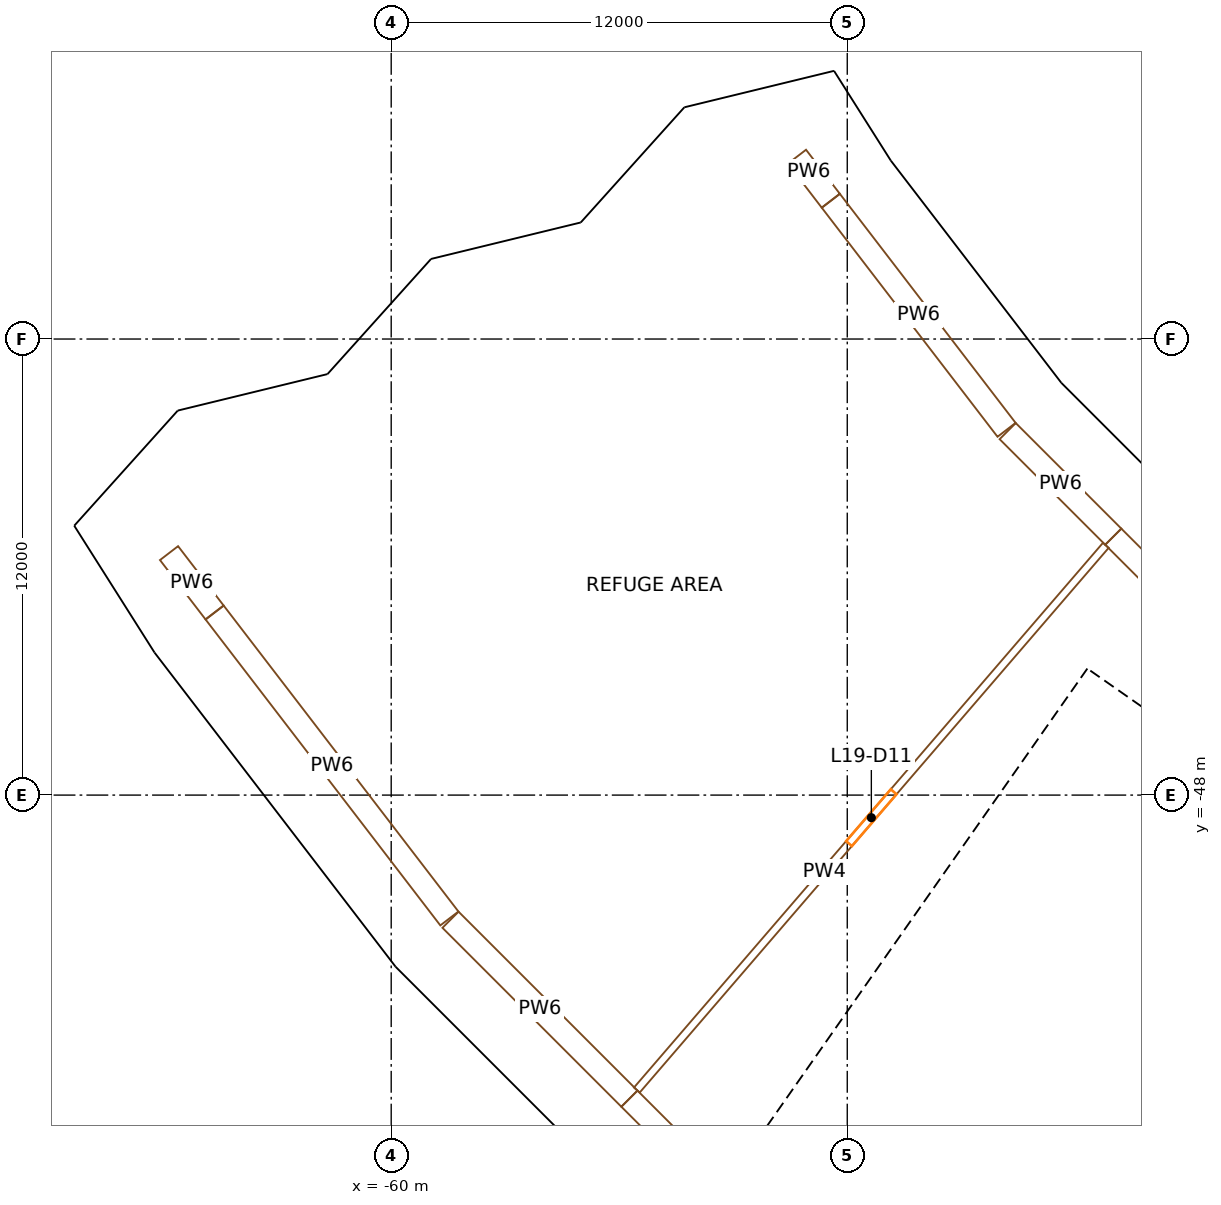
"""IFC4 building model, lengths in metres.
Left out: names, types, materials, properties, quantities, classifications, styles, units other than length and angle.
Written with IfcOpenShell. Run it as: python <this file> out.ifc"""

import sys

from ifc_helpers import new_model, si_unit, direction, frame, frame_2d, origin, origin_2d, place, context, subcontext, project, spatial, rectangle, extrude, element, fill, save


model = new_model("IFC4")
c1 = context("Model", 3, precision=1e-05, world=origin(), true_north=direction((0.0, 1.0)))
c2 = subcontext(c1, "Body", "Model", "MODEL_VIEW")
j1 = project(units=[si_unit("LENGTHUNIT", "METRE"), si_unit("PLANEANGLEUNIT", "RADIAN")], contexts=[c1])
p1 = place(None, origin())
s1 = spatial("IfcSite", under=j1, at=p1, CompositionType="ELEMENT")
p2 = place(p1, origin())
s2 = spatial("IfcBuilding", under=s1, at=p2, CompositionType="ELEMENT")
p3 = place(p2, frame((0.0, 0.0, 89.9)))
s3 = spatial("IfcBuildingStorey", under=s2, at=p3, CompositionType="ELEMENT", Elevation=89.9)
for number, where, z_axis, x_axis in (
    (1, (-48.433, -32.362, 0.0), (0.0, 0.0, 1.0), (0.556, -0.831, 0.0)),
    (2, (-64.647, -43.196, 0.0), (0.0, 0.0, 1.0), (0.556, -0.831, 0.0)),
    (3, (-43.795, -38.407, 0.0), (0.0, 0.0, 1.0), (0.659, -0.752, 0.0)),
    (4, (-58.456, -51.264, 0.0), (0.0, 0.0, 1.0), (0.659, -0.752, 0.0)),
):
    element("IfcColumn", number, at=place(p3, frame(where, z_axis=z_axis, x_axis=x_axis)), inside=s3, PredefinedType="COLUMN", context=c2, shape_type="SweptSolid", body=[
        extrude(rectangle(XDim=1.3, YDim=1.7, at=origin_2d()), origin(), (0.0, 0.0, 1.0), 5.0),
    ])
p4 = place(p3, frame((-69.732, -34.388, 0.0), z_axis=(0.0, 0.0, 1.0), x_axis=(0.442288690219, -0.896872741533, 0.0)))
e5 = element("IfcColumn", 5, at=p4, inside=s3, PredefinedType="COLUMN", context=c2, shape_type="SweptSolid", body=[
    extrude(rectangle(XDim=1.3, YDim=1.7, at=origin_2d()), origin(), (0.0, 0.0, 1.0), 4.7),
])
p5 = place(p3, frame((-49.779, -57.191, 0.0), z_axis=(0.0, 0.0, 1.0), x_axis=(0.573577477574, 0.819151315216, 0.0)))
e6 = element("IfcWall", 6, at=p5, inside=s3, PredefinedType="SHEAR", context=c2, shape_type="SweptSolid", body=[
    extrude(rectangle(XDim=14.8, YDim=0.9, at=frame_2d((7.4, 0.0))), origin(), (0.0, 0.0, 1.0), 4.7),
])
p6 = place(p5, frame((6.7, 0.0, 0.0)))
e7 = element("IfcOpeningElement", 7, at=p6, cuts=e6, PredefinedType="OPENING", context=c2, shape_type="SweptSolid", body=[
    extrude(rectangle(XDim=1.4, YDim=2.1, at=frame_2d((0.7, 1.05))), frame((0.0, 0.46, 0.0), z_axis=(0.0, -1.0, 0.0), x_axis=(1.0, 0.0, 0.0)), (0.0, 0.0, 1.0), 0.92),
])
p7 = place(p3, frame((-28.854, -54.324, 0.0), z_axis=(0.0, 0.0, 1.0), x_axis=(-0.819145767589, 0.573585400304, 0.0)))
e8 = element("IfcWall", 8, at=p7, inside=s3, PredefinedType="SHEAR", context=c2, shape_type="SweptSolid", body=[
    extrude(rectangle(XDim=15.045, YDim=0.9, at=frame_2d((7.523, 0.0))), origin(), (0.0, 0.0, 1.0), 4.7),
])
p8 = place(p7, frame((3.45, 0.0, 0.0)))
e9 = element("IfcOpeningElement", 9, at=p8, cuts=e8, PredefinedType="OPENING", context=c2, shape_type="SweptSolid", body=[
    extrude(rectangle(XDim=1.0, YDim=2.1, at=frame_2d((0.5, 1.05))), frame((0.0, 0.46, 0.0), z_axis=(0.0, -1.0, 0.0), x_axis=(1.0, 0.0, 0.0)), (0.0, 0.0, 1.0), 0.92),
])
p9 = place(p7, frame((13.495, 0.0, 0.0)))
e10 = element("IfcOpeningElement", 10, at=p9, cuts=e8, PredefinedType="OPENING", context=c2, shape_type="SweptSolid", body=[
    extrude(rectangle(XDim=1.1, YDim=2.1, at=frame_2d((0.55, 1.05))), frame((0.0, 0.46, 0.0), z_axis=(0.0, -1.0, 0.0), x_axis=(1.0, 0.0, 0.0)), (0.0, 0.0, 1.0), 0.92),
])
p10 = place(p3, frame((-43.204, -60.696, 0.0), z_axis=(0.0, 0.0, 1.0), x_axis=(0.573571992966, 0.819155155563, 0.0)))
e11 = element("IfcWall", 11, at=p10, inside=s3, PredefinedType="SOLIDWALL", context=c2, shape_type="SweptSolid", body=[
    extrude(rectangle(XDim=13.0, YDim=0.3, at=frame_2d((6.5, 0.0))), origin(), (0.0, 0.0, 1.0), 4.7),
])
p11 = place(p3, frame((-33.787, -61.369, 0.0), z_axis=(0.0, 0.0, 1.0), x_axis=(-0.819152564888, 0.573575692858, 0.0)))
e12 = element("IfcWall", 12, at=p11, inside=s3, PredefinedType="SOLIDWALL", context=c2, shape_type="SweptSolid", body=[
    extrude(rectangle(XDim=7.95, YDim=0.3, at=frame_2d((3.975, 0.0))), origin(), (0.0, 0.0, 1.0), 4.7),
])
p12 = place(p11, frame((3.475, 0.0, 0.0)))
e13 = element("IfcOpeningElement", 13, at=p12, cuts=e12, PredefinedType="OPENING", context=c2, shape_type="SweptSolid", body=[
    extrude(rectangle(XDim=1.0, YDim=2.1, at=frame_2d((0.5, 1.05))), frame((0.0, 0.16, 0.0), z_axis=(0.0, -1.0, 0.0), x_axis=(1.0, 0.0, 0.0)), (0.0, 0.0, 1.0), 0.32),
])
p13 = place(p3, frame((-37.936, -52.91, 0.0), z_axis=(0.0, 0.0, 1.0), x_axis=(-0.819147518138, 0.57358290031, 0.0)))
e14 = element("IfcWall", 14, at=p13, inside=s3, PredefinedType="SOLIDWALL", context=c2, shape_type="SweptSolid", body=[
    extrude(rectangle(XDim=6.795, YDim=0.3, at=frame_2d((3.398, 0.0))), origin(), (0.0, 0.0, 1.0), 4.7),
])
p14 = place(p13, frame((5.32, 0.0, 0.0)))
e15 = element("IfcOpeningElement", 15, at=p14, cuts=e14, PredefinedType="OPENING", context=c2, shape_type="SweptSolid", body=[
    extrude(rectangle(XDim=1.1, YDim=2.1, at=frame_2d((0.55, 1.05))), frame((0.0, 0.16, 0.0), z_axis=(0.0, -1.0, 0.0), x_axis=(1.0, 0.0, 0.0)), (0.0, 0.0, 1.0), 0.32),
])
p15 = place(p3, frame((-41.262, -57.661, 0.0), z_axis=(0.0, 0.0, 1.0), x_axis=(-0.819164398642, 0.573558792102, 0.0)))
e16 = element("IfcWall", 16, at=p15, inside=s3, PredefinedType="SOLIDWALL", context=c2, shape_type="SweptSolid", body=[
    extrude(rectangle(XDim=6.795, YDim=0.3, at=frame_2d((3.397, 0.0))), origin(), (0.0, 0.0, 1.0), 4.7),
])
p16 = place(p15, frame((5.32, 0.0, 0.0)))
e17 = element("IfcOpeningElement", 17, at=p16, cuts=e16, PredefinedType="OPENING", context=c2, shape_type="SweptSolid", body=[
    extrude(rectangle(XDim=1.1, YDim=2.1, at=frame_2d((0.55, 1.05))), frame((0.0, 0.16, 0.0), z_axis=(0.0, -1.0, 0.0), x_axis=(1.0, 0.0, 0.0)), (0.0, 0.0, 1.0), 0.32),
])
p17 = place(p3, frame((-39.599, -55.285, 0.0), z_axis=(0.0, 0.0, 1.0), x_axis=(-0.819136323161, 0.573598887793, 0.0)))
e18 = element("IfcWall", 18, at=p17, inside=s3, PredefinedType="SOLIDWALL", context=c2, shape_type="SweptSolid", body=[
    extrude(rectangle(XDim=3.0, YDim=0.5, at=frame_2d((1.5, 0.0))), origin(), (0.0, 0.0, 1.0), 4.7),
])
p18 = place(p3, frame((-43.757, -55.731, 0.0), z_axis=(0.0, 0.0, 1.0), x_axis=(0.573536818435, 0.819179783625, 0.0)))
e19 = element("IfcWall", 19, at=p18, inside=s3, PredefinedType="SOLIDWALL", context=c2, shape_type="SweptSolid", body=[
    extrude(rectangle(XDim=5.5, YDim=0.3, at=frame_2d((2.75, 0.0))), origin(), (0.0, 0.0, 1.0), 4.7),
])
p19 = place(p18, frame((0.7, 0.0, 0.0)))
e20 = element("IfcOpeningElement", 20, at=p19, cuts=e19, PredefinedType="OPENING", context=c2, shape_type="SweptSolid", body=[
    extrude(rectangle(XDim=1.1, YDim=2.1, at=frame_2d((0.55, 1.05))), frame((0.0, 0.16, 0.0), z_axis=(0.0, -1.0, 0.0), x_axis=(1.0, 0.0, 0.0)), (0.0, 0.0, 1.0), 0.32),
])
p20 = place(p18, frame((3.7, 0.0, 0.0)))
e21 = element("IfcOpeningElement", 21, at=p20, cuts=e19, PredefinedType="OPENING", context=c2, shape_type="SweptSolid", body=[
    extrude(rectangle(XDim=1.1, YDim=2.1, at=frame_2d((0.55, 1.05))), frame((0.0, 0.16, 0.0), z_axis=(0.0, -1.0, 0.0), x_axis=(1.0, 0.0, 0.0)), (0.0, 0.0, 1.0), 0.32),
])
p21 = place(p3, frame((-41.587, -48.369, 0.0), z_axis=(0.0, 0.0, 1.0), x_axis=(0.573495128918, 0.819208970354, 0.0)))
e22 = element("IfcWall", 22, at=p21, inside=s3, PredefinedType="SOLIDWALL", context=c2, shape_type="SweptSolid", body=[
    extrude(rectangle(XDim=0.5, YDim=0.3, at=frame_2d((0.25, 0.0))), origin(), (0.0, 0.0, 1.0), 2.3),
])
p22 = place(p3, frame((-47.065, -56.192, 0.0), z_axis=(0.0, 0.0, 1.0), x_axis=(0.573822822947, 0.818979467304, 0.0)))
e23 = element("IfcWall", 23, at=p22, inside=s3, PredefinedType="SOLIDWALL", context=c2, shape_type="SweptSolid", body=[
    extrude(rectangle(XDim=0.5, YDim=0.3, at=frame_2d((0.25, 0.0))), origin(), (0.0, 0.0, 1.0), 2.3),
])
p23 = place(p3, frame((-48.256, -29.127, 0.0), z_axis=(0.0, 0.0, 1.0), x_axis=(-0.971599606195, -0.236630947347, 0.0)))
e24 = element("IfcWall", 24, at=p23, inside=s3, PredefinedType="SOLIDWALL", context=c2, shape_type="SweptSolid", body=[
    extrude(rectangle(XDim=4.147, YDim=0.4, at=frame_2d((2.074, 0.0))), origin(), (0.0, 0.0, 1.0), 3.6),
])
p24 = place(p3, frame((-52.315, -30.234, 0.0), z_axis=(0.0, 0.0, 1.0), x_axis=(-0.668791930539, -0.743449630874, 0.0)))
e25 = element("IfcWall", 25, at=p24, inside=s3, PredefinedType="SOLIDWALL", context=c2, shape_type="SweptSolid", body=[
    extrude(rectangle(XDim=3.669, YDim=0.4, at=frame_2d((1.834, 0.0))), origin(), (0.0, 0.0, 1.0), 3.6),
])
p25 = place(p3, frame((-54.798, -33.087, 0.0), z_axis=(0.0, 0.0, 1.0), x_axis=(-0.97158316365, -0.236698449745, 0.0)))
e26 = element("IfcWall", 26, at=p25, inside=s3, PredefinedType="SOLIDWALL", context=c2, shape_type="SweptSolid", body=[
    extrude(rectangle(XDim=4.274, YDim=0.4, at=frame_2d((2.137, 0.0))), origin(), (0.0, 0.0, 1.0), 3.6),
])
p26 = place(p3, frame((-58.98, -34.224, 0.0), z_axis=(0.0, 0.0, 1.0), x_axis=(-0.66870725962, -0.74352579036, 0.0)))
e27 = element("IfcWall", 27, at=p26, inside=s3, PredefinedType="SOLIDWALL", context=c2, shape_type="SweptSolid", body=[
    extrude(rectangle(XDim=3.668, YDim=0.4, at=frame_2d((1.834, 0.0))), origin(), (0.0, 0.0, 1.0), 3.6),
])
p27 = place(p3, frame((-61.462, -37.076, 0.0), z_axis=(0.0, 0.0, 1.0), x_axis=(-0.971569694649, -0.236753729518, 0.0)))
e28 = element("IfcWall", 28, at=p27, inside=s3, PredefinedType="SOLIDWALL", context=c2, shape_type="SweptSolid", body=[
    extrude(rectangle(XDim=4.275, YDim=0.4, at=frame_2d((2.138, 0.0))), origin(), (0.0, 0.0, 1.0), 3.6),
])
p28 = place(p3, frame((-65.645, -38.214, 0.0), z_axis=(0.0, 0.0, 1.0), x_axis=(-0.668632717238, -0.743592825032, 0.0)))
e29 = element("IfcWall", 29, at=p28, inside=s3, PredefinedType="SOLIDWALL", context=c2, shape_type="SweptSolid", body=[
    extrude(rectangle(XDim=3.413, YDim=0.4, at=frame_2d((1.707, 0.0))), origin(), (0.0, 0.0, 1.0), 3.6),
])
p29 = place(p3, frame((-47.038, -31.389, 0.0), z_axis=(0.0, 0.0, 1.0), x_axis=(-0.534817117293, 0.844967840246, 0.0)))
e30 = element("IfcWall", 30, at=p29, inside=s3, PredefinedType="SOLIDWALL", context=c2, shape_type="SweptSolid", body=[
    extrude(rectangle(XDim=2.373, YDim=0.4, at=frame_2d((1.187, 0.0))), origin(), (0.0, 0.0, 1.0), 3.6),
])
p30 = place(p3, frame((-42.502, -37.306, 0.0), z_axis=(0.0, 0.0, 1.0), x_axis=(-0.60873951703, 0.793370153463, 0.0)))
e31 = element("IfcWall", 31, at=p30, inside=s3, PredefinedType="SOLIDWALL", context=c2, shape_type="SweptSolid", body=[
    extrude(rectangle(XDim=7.438, YDim=0.4, at=frame_2d((3.719, 0.0))), origin(), (0.0, 0.0, 1.0), 3.6),
])
p31 = place(p3, frame((-37.322, -42.481, 0.0), z_axis=(0.0, 0.0, 1.0), x_axis=(-0.707106781187, 0.707106781187, 0.0)))
e32 = element("IfcWall", 32, at=p31, inside=s3, PredefinedType="SOLIDWALL", context=c2, shape_type="SweptSolid", body=[
    extrude(rectangle(XDim=7.295, YDim=0.4, at=frame_2d((3.648, 0.0))), origin(), (0.0, 0.0, 1.0), 3.6),
])
p32 = place(p3, frame((-68.191, -40.772, 0.0), z_axis=(0.0, 0.0, 1.0), x_axis=(0.534740631213, -0.845016246785, 0.0)))
e33 = element("IfcWall", 33, at=p32, inside=s3, PredefinedType="SOLIDWALL", context=c2, shape_type="SweptSolid", body=[
    extrude(rectangle(XDim=2.014, YDim=0.4, at=frame_2d((1.007, 0.0))), origin(), (0.0, 0.0, 1.0), 3.6),
])
p33 = place(p3, frame((-67.114, -42.475, 0.0), z_axis=(0.0, 0.0, 1.0), x_axis=(0.53475095045, -0.845009716508, 0.0)))
e34 = element("IfcWall", 34, at=p33, inside=s3, PredefinedType="SOLIDWALL", context=c2, shape_type="SweptSolid", body=[
    extrude(rectangle(XDim=1.987, YDim=0.4, at=frame_2d((0.993, 0.0))), origin(), (0.0, 0.0, 1.0), 3.6),
])
p34 = place(p3, frame((-66.039, -44.167, 0.0), z_axis=(0.0, 0.0, 1.0), x_axis=(0.608759161383, -0.793355080296, 0.0)))
e35 = element("IfcWall", 35, at=p34, inside=s3, PredefinedType="SOLIDWALL", context=c2, shape_type="SweptSolid", body=[
    extrude(rectangle(XDim=10.308, YDim=0.4, at=frame_2d((5.154, 0.0))), origin(), (0.0, 0.0, 1.0), 3.6),
])
p35 = place(p3, frame((-59.751, -52.367, 0.0), z_axis=(0.0, 0.0, 1.0), x_axis=(0.707106781187, -0.707106781187, 0.0)))
e36 = element("IfcWall", 36, at=p35, inside=s3, PredefinedType="SOLIDWALL", context=c2, shape_type="SweptSolid", body=[
    extrude(rectangle(XDim=10.443, YDim=0.4, at=frame_2d((5.221, 0.0))), origin(), (0.0, 0.0, 1.0), 3.6),
])
p36 = place(p3, frame((-65.846, -41.633, 0.0), z_axis=(0.0, 0.0, 1.0), x_axis=(0.608744279495, -0.793366499281, 0.0)))
e37 = element("IfcWall", 37, at=p36, inside=s3, PredefinedType="PARTITIONING", context=c2, shape_type="SweptSolid", body=[
    extrude(rectangle(XDim=1.966, YDim=0.6, at=frame_2d((0.983, 0.0))), origin(), (0.0, 0.0, 1.0), 3.6),
])
p37 = place(p3, frame((-64.645, -43.198, 0.0), z_axis=(0.0, 0.0, 1.0), x_axis=(0.608777573681, -0.793340951787, 0.0)))
e38 = element("IfcWall", 38, at=p37, inside=s3, PredefinedType="PARTITIONING", context=c2, shape_type="SweptSolid", body=[
    extrude(rectangle(XDim=10.145, YDim=0.6, at=frame_2d((5.072, 0.0))), origin(), (0.0, 0.0, 1.0), 3.6),
])
p38 = place(p3, frame((-58.439, -51.28, 0.0), z_axis=(0.0, 0.0, 1.0), x_axis=(0.707106781187, -0.707106781187, 0.0)))
e39 = element("IfcWall", 39, at=p38, inside=s3, PredefinedType="PARTITIONING", context=c2, shape_type="SweptSolid", body=[
    extrude(rectangle(XDim=6.657, YDim=0.6, at=frame_2d((3.329, 0.0))), origin(), (0.0, 0.0, 1.0), 3.6),
])
p39 = place(p3, frame((-53.732, -55.988, 0.0), z_axis=(0.0, 0.0, 1.0), x_axis=(0.707106781187, -0.707106781187, 0.0)))
e40 = element("IfcWall", 40, at=p39, inside=s3, PredefinedType="PARTITIONING", context=c2, shape_type="SweptSolid", body=[
    extrude(rectangle(XDim=3.468, YDim=0.6, at=frame_2d((1.734, 0.0))), origin(), (0.0, 0.0, 1.0), 3.6),
])
p40 = place(p3, frame((-49.323, -31.202, 0.0), z_axis=(0.0, 0.0, 1.0), x_axis=(0.608747741754, -0.793363842704, 0.0)))
e41 = element("IfcWall", 41, at=p40, inside=s3, PredefinedType="PARTITIONING", context=c2, shape_type="SweptSolid", body=[
    extrude(rectangle(XDim=1.459, YDim=0.6, at=frame_2d((0.729, 0.0))), origin(), (0.0, 0.0, 1.0), 3.6),
])
p41 = place(p3, frame((-48.431, -32.364, 0.0), z_axis=(0.0, 0.0, 1.0), x_axis=(0.608775025132, -0.793342907434, 0.0)))
e42 = element("IfcWall", 42, at=p41, inside=s3, PredefinedType="PARTITIONING", context=c2, shape_type="SweptSolid", body=[
    extrude(rectangle(XDim=7.594, YDim=0.6, at=frame_2d((3.797, 0.0))), origin(), (0.0, 0.0, 1.0), 3.6),
])
p42 = place(p3, frame((-43.779, -38.423, 0.0), z_axis=(0.0, 0.0, 1.0), x_axis=(0.707075708448, -0.70713785256, 0.0)))
e43 = element("IfcWall", 43, at=p42, inside=s3, PredefinedType="PARTITIONING", context=c2, shape_type="SweptSolid", body=[
    extrude(rectangle(XDim=3.929, YDim=0.6, at=frame_2d((1.964, 0.0))), origin(), (0.0, 0.0, 1.0), 3.6),
])
p43 = place(p3, frame((-53.536, -55.76, 0.0), z_axis=(0.0, 0.0, 1.0), x_axis=(0.652481130337, 0.757804971318, 0.0)))
e44 = element("IfcWall", 44, at=p43, inside=s3, PredefinedType="PARTITIONING", context=c2, shape_type="SweptSolid", body=[
    extrude(rectangle(XDim=18.913, YDim=0.2, at=frame_2d((9.456, 0.0))), origin(), (0.0, 0.0, 1.0), 3.6),
])
p44 = place(p43, frame((8.556, 0.0, 0.0)))
e45 = element("IfcOpeningElement", 45, at=p44, cuts=e44, PredefinedType="OPENING", context=c2, shape_type="SweptSolid", body=[
    extrude(rectangle(XDim=1.8, YDim=2.4, at=frame_2d((0.9, 1.2))), frame((0.0, 0.11, 0.0), z_axis=(0.0, -1.0, 0.0), x_axis=(1.0, 0.0, 0.0)), (0.0, 0.0, 1.0), 0.22),
])
p45 = place(p3, frame((-41.001, -41.201, 0.0), z_axis=(0.0, 0.0, 1.0), x_axis=(0.707140265585, -0.707073295203, 0.0)))
e46 = element("IfcWall", 46, at=p45, inside=s3, PredefinedType="PARTITIONING", context=c2, shape_type="SweptSolid", body=[
    extrude(rectangle(XDim=3.646, YDim=0.6, at=frame_2d((1.823, 0.0))), origin(), (0.0, 0.0, 1.0), 3.6),
])
p46 = place(p19, origin())
e47 = element("IfcDoor", 47, at=p46, inside=s3, OperationType="DOUBLE_DOOR_SLIDING", PredefinedType="DOOR", context=c2, shape_type="SweptSolid", body=[
    extrude(rectangle(XDim=1.1, YDim=2.1, at=frame_2d((0.55, 1.05))), frame((0.0, 0.025, 0.0), z_axis=(0.0, -1.0, 0.0), x_axis=(1.0, 0.0, 0.0)), (0.0, 0.0, 1.0), 0.05),
])
fill(e20, e47)
p47 = place(p20, origin())
e48 = element("IfcDoor", 48, at=p47, inside=s3, OperationType="DOUBLE_DOOR_SLIDING", PredefinedType="DOOR", context=c2, shape_type="SweptSolid", body=[
    extrude(rectangle(XDim=1.1, YDim=2.1, at=frame_2d((0.55, 1.05))), frame((0.0, 0.025, 0.0), z_axis=(0.0, -1.0, 0.0), x_axis=(1.0, 0.0, 0.0)), (0.0, 0.0, 1.0), 0.05),
])
fill(e21, e48)
p48 = place(p6, origin())
e49 = element("IfcDoor", 49, at=p48, inside=s3, OperationType="DOUBLE_DOOR_SINGLE_SWING", PredefinedType="DOOR", context=c2, shape_type="SweptSolid", body=[
    extrude(rectangle(XDim=1.4, YDim=2.1, at=frame_2d((0.7, 1.05))), frame((0.0, 0.025, 0.0), z_axis=(0.0, -1.0, 0.0), x_axis=(1.0, 0.0, 0.0)), (0.0, 0.0, 1.0), 0.05),
])
fill(e7, e49)
p49 = place(p9, origin())
e50 = element("IfcDoor", 50, at=p49, inside=s3, OperationType="SINGLE_SWING_RIGHT", PredefinedType="DOOR", context=c2, shape_type="SweptSolid", body=[
    extrude(rectangle(XDim=1.1, YDim=2.1, at=frame_2d((0.55, 1.05))), frame((0.0, 0.025, 0.0), z_axis=(0.0, -1.0, 0.0), x_axis=(1.0, 0.0, 0.0)), (0.0, 0.0, 1.0), 0.05),
])
fill(e10, e50)
p50 = place(p14, origin())
e51 = element("IfcDoor", 51, at=p50, inside=s3, OperationType="SINGLE_SWING_LEFT", PredefinedType="DOOR", context=c2, shape_type="SweptSolid", body=[
    extrude(rectangle(XDim=1.1, YDim=2.1, at=frame_2d((0.55, 1.05))), frame((0.0, 0.025, 0.0), z_axis=(0.0, -1.0, 0.0), x_axis=(1.0, 0.0, 0.0)), (0.0, 0.0, 1.0), 0.05),
])
fill(e15, e51)
p51 = place(p16, origin())
e52 = element("IfcDoor", 52, at=p51, inside=s3, OperationType="SINGLE_SWING_LEFT", PredefinedType="DOOR", context=c2, shape_type="SweptSolid", body=[
    extrude(rectangle(XDim=1.1, YDim=2.1, at=frame_2d((0.55, 1.05))), frame((0.0, 0.025, 0.0), z_axis=(0.0, -1.0, 0.0), x_axis=(1.0, 0.0, 0.0)), (0.0, 0.0, 1.0), 0.05),
])
fill(e17, e52)
p52 = place(p44, origin())
e53 = element("IfcDoor", 53, at=p52, inside=s3, OperationType="DOUBLE_DOOR_SINGLE_SWING", PredefinedType="DOOR", context=c2, shape_type="SweptSolid", body=[
    extrude(rectangle(XDim=1.8, YDim=2.4, at=frame_2d((0.9, 1.2))), frame((0.0, 0.025, 0.0), z_axis=(0.0, -1.0, 0.0), x_axis=(1.0, 0.0, 0.0)), (0.0, 0.0, 1.0), 0.05),
])
fill(e45, e53)
save(model, sys.argv[1])
